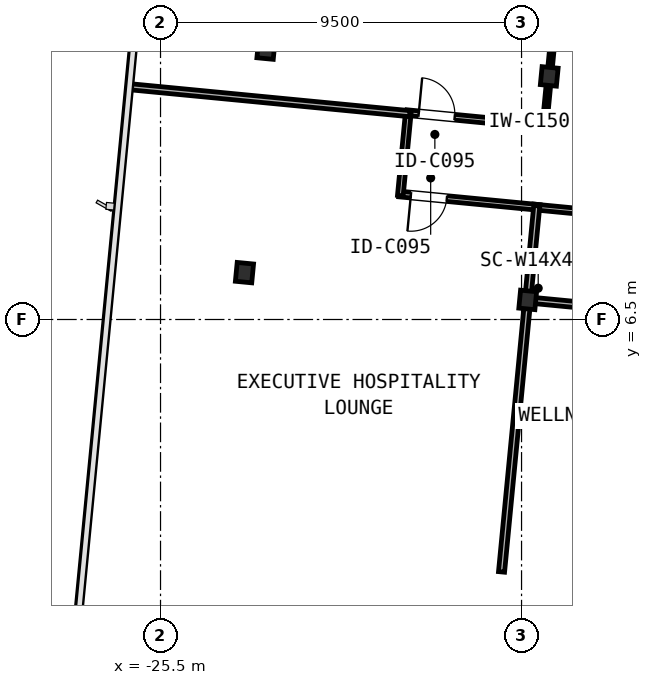
"""IFC4 building model, lengths in metres.
Left out: names, types, materials, properties, quantities, classifications, styles, units other than length and angle.
Written with IfcOpenShell. Run it as: python <this file> out.ifc"""

import sys

from ifc_helpers import new_model, si_unit, direction, frame, frame_2d, origin, origin_2d, place, context, subcontext, project, spatial, rectangle, i_section, extrude, element, fill, save


model = new_model("IFC4")
c1 = context("Model", 3, precision=1e-05, world=origin(), true_north=direction((0.0, 1.0)))
c2 = subcontext(c1, "Body", "Model", "MODEL_VIEW")
j1 = project(units=[si_unit("LENGTHUNIT", "METRE"), si_unit("PLANEANGLEUNIT", "RADIAN")], contexts=[c1])
p1 = place(None, origin())
s1 = spatial("IfcSite", under=j1, at=p1, CompositionType="ELEMENT")
p2 = place(p1, origin())
s2 = spatial("IfcBuilding", under=s1, at=p2, CompositionType="ELEMENT")
p3 = place(p2, frame((0.0, 0.0, 142.8)))
s3 = spatial("IfcBuildingStorey", under=s2, at=p3, CompositionType="ELEMENT", Elevation=142.8)
for number, where, z_axis, x_axis in (
    (1, (-23.291, 7.733, 0.0), (0.0, 0.0, 1.0), (0.995, -0.096, 0.0)),
    (2, (-22.725, 13.614, 0.0), (0.0, 0.0, 1.0), (0.995, -0.096, 0.0)),
):
    element("IfcColumn", number, at=place(p3, frame(where, z_axis=z_axis, x_axis=x_axis)), inside=s3, PredefinedType="COLUMN", context=c2, shape_type="SweptSolid", body=[
        extrude(i_section(OverallWidth=0.432, OverallDepth=0.498, WebThickness=0.056, FlangeThickness=0.089, FilletRadius=0.031, at=origin_2d()), origin(), (0.0, 0.0, 1.0), 3.45),
    ])
for number, where, z_axis, x_axis in (
    (3, (-15.837, 7.015, 0.0), (0.0, 0.0, 1.0), (0.995, -0.096, 0.0)),
    (4, (-15.271, 12.896, 0.0), (0.0, 0.0, 1.0), (0.995, -0.096, 0.0)),
):
    element("IfcColumn", number, at=place(p3, frame(where, z_axis=z_axis, x_axis=x_axis)), inside=s3, PredefinedType="COLUMN", context=c2, shape_type="SweptSolid", body=[
        extrude(i_section(OverallWidth=0.424, OverallDepth=0.474, WebThickness=0.048, FlangeThickness=0.077, FilletRadius=0.031, at=origin_2d()), origin(), (0.0, 0.0, 1.0), 3.45),
    ])
p4 = place(p3, frame((-19.02, 11.943, 0.0), z_axis=(0.0, 0.0, 1.0), x_axis=(0.995397364202, -0.095833644092, 0.0)))
e5 = element("IfcWall", 5, at=p4, inside=s3, PredefinedType="PARTITIONING", context=c2, shape_type="SweptSolid", body=[
    extrude(rectangle(XDim=3.722, YDim=0.15, at=frame_2d((1.861, 0.0))), origin(), (0.0, 0.0, 1.0), 2.479),
])
p5 = place(p4, frame((0.315, 0.0, 0.0)))
e6 = element("IfcOpeningElement", 6, at=p5, cuts=e5, PredefinedType="OPENING", context=c2, shape_type="SweptSolid", body=[
    extrude(rectangle(XDim=0.95, YDim=2.15, at=frame_2d((0.475, 1.075))), frame((0.0, 0.085, 0.0), z_axis=(0.0, -1.0, 0.0), x_axis=(1.0, 0.0, 0.0)), (0.0, 0.0, 1.0), 0.17),
])
p6 = place(p3, frame((-15.478, 11.602, 0.0), z_axis=(0.0, 0.0, 1.0), x_axis=(0.995398413865, -0.095822740911, 0.0)))
e7 = element("IfcWall", 7, at=p6, inside=s3, PredefinedType="PARTITIONING", context=c2, shape_type="SweptSolid", body=[
    extrude(rectangle(XDim=2.614, YDim=0.15, at=frame_2d((1.307, 0.0))), origin(), (0.0, 0.0, 1.0), 2.479),
])
p7 = place(p3, frame((3.121, 7.651, 0.0), z_axis=(0.0, 0.0, 1.0), x_axis=(-0.995397135603, 0.095836018457, 0.0)))
e8 = element("IfcWall", 8, at=p7, inside=s3, PredefinedType="PARTITIONING", context=c2, shape_type="SweptSolid", body=[
    extrude(rectangle(XDim=18.892, YDim=0.15, at=frame_2d((9.446, 0.0))), origin(), (0.0, 0.0, 1.0), 2.479),
])
p8 = place(p7, frame((14.502, 0.0, 0.0)))
e9 = element("IfcOpeningElement", 9, at=p8, cuts=e8, PredefinedType="OPENING", context=c2, shape_type="SweptSolid", body=[
    extrude(rectangle(XDim=0.95, YDim=2.15, at=frame_2d((0.475, 1.075))), frame((0.0, 0.085, 0.0), z_axis=(0.0, -1.0, 0.0), x_axis=(1.0, 0.0, 0.0)), (0.0, 0.0, 1.0), 0.17),
])
p9 = place(p3, frame((-15.521, 9.446, 0.0), z_axis=(0.0, 0.0, 1.0), x_axis=(-0.995397364202, 0.095833644092, 0.0)))
e10 = element("IfcWall", 10, at=p9, inside=s3, PredefinedType="PARTITIONING", context=c2, shape_type="SweptSolid", body=[
    extrude(rectangle(XDim=3.722, YDim=0.15, at=frame_2d((1.861, 0.0))), origin(), (0.0, 0.0, 1.0), 2.479),
])
p10 = place(p9, frame((2.457, 0.0, 0.0)))
e11 = element("IfcOpeningElement", 11, at=p10, cuts=e10, PredefinedType="OPENING", context=c2, shape_type="SweptSolid", body=[
    extrude(rectangle(XDim=0.95, YDim=2.15, at=frame_2d((0.475, 1.075))), frame((0.0, 0.085, 0.0), z_axis=(0.0, -1.0, 0.0), x_axis=(1.0, 0.0, 0.0)), (0.0, 0.0, 1.0), 0.17),
])
p11 = place(p3, frame((-19.19, 9.759, 0.0), z_axis=(0.0, 0.0, 1.0), x_axis=(0.095882898123, 0.995392620953, 0.0)))
e12 = element("IfcWall", 12, at=p11, inside=s3, PredefinedType="PARTITIONING", context=c2, shape_type="SweptSolid", body=[
    extrude(rectangle(XDim=2.21, YDim=0.15, at=frame_2d((1.105, 0.0))), origin(), (0.0, 0.0, 1.0), 2.718),
])
p12 = place(p3, frame((-15.288, 12.721, 0.0), z_axis=(0.0, 0.0, 1.0), x_axis=(-0.095831494917, -0.995397571115, 0.0)))
e13 = element("IfcWall", 13, at=p12, inside=s3, PredefinedType="PARTITIONING", context=c2, shape_type="SweptSolid", body=[
    extrude(rectangle(XDim=1.172, YDim=0.12, at=frame_2d((0.586, 0.0))), origin(), (0.0, 0.0, 1.0), 2.479),
])
p13 = place(p3, frame((-15.144, 14.214, 0.0), z_axis=(0.0, 0.0, 1.0), x_axis=(-0.09590284245, -0.99539069958, 0.0)))
e14 = element("IfcWall", 14, at=p13, inside=s3, PredefinedType="PARTITIONING", context=c2, shape_type="SweptSolid", body=[
    extrude(rectangle(XDim=1.148, YDim=0.12, at=frame_2d((0.574, 0.0))), origin(), (0.0, 0.0, 1.0), 2.479),
])
p14 = place(p3, frame((-18.942, 11.916, 0.0), z_axis=(0.0, 0.0, 1.0), x_axis=(-0.995395927026, 0.095848570461, 0.0)))
e15 = element("IfcWall", 15, at=p14, inside=s3, PredefinedType="PARTITIONING", context=c2, shape_type="SweptSolid", body=[
    extrude(rectangle(XDim=7.448, YDim=0.16, at=frame_2d((3.724, 0.0))), origin(), (0.0, 0.0, 1.0), 2.557),
])
p15 = place(p3, frame((-15.821, 7.191, 0.0), z_axis=(0.0, 0.0, 1.0), x_axis=(0.09580488871, 0.995400132258, 0.0)))
e16 = element("IfcWall", 16, at=p15, inside=s3, PredefinedType="PARTITIONING", context=c2, shape_type="SweptSolid", body=[
    extrude(rectangle(XDim=2.314, YDim=0.16, at=frame_2d((1.157, 0.0))), origin(), (0.0, 0.0, 1.0), 2.479),
])
p16 = place(p3, frame((-8.093, 6.27, 0.0), z_axis=(0.0, 0.0, 1.0), x_axis=(-0.995396962155, 0.095837819954, 0.0)))
e17 = element("IfcWall", 17, at=p16, inside=s3, PredefinedType="PARTITIONING", context=c2, shape_type="SweptSolid", body=[
    extrude(rectangle(XDim=7.604, YDim=0.16, at=frame_2d((3.802, 0.0))), origin(), (0.0, 0.0, 1.0), 2.479),
])
p17 = place(p3, frame((-15.854, 6.84, 0.0), z_axis=(0.0, 0.0, 1.0), x_axis=(-0.095860309466, -0.995394796585, 0.0)))
e18 = element("IfcWall", 18, at=p17, inside=s3, PredefinedType="PARTITIONING", context=c2, shape_type="SweptSolid", body=[
    extrude(rectangle(XDim=7.014, YDim=0.16, at=frame_2d((3.507, 0.0))), origin(), (0.0, 0.0, 1.0), 2.479),
])
p18 = place(p5, frame((0.95, 0.0, 0.0), z_axis=(0.0, 0.0, 1.0), x_axis=(-1.0, 0.0, 0.0)))
e19 = element("IfcDoor", 19, at=p18, inside=s3, OperationType="SINGLE_SWING_LEFT", PredefinedType="DOOR", context=c2, shape_type="SweptSolid", body=[
    extrude(rectangle(XDim=0.95, YDim=2.15, at=frame_2d((0.475, 1.075))), frame((0.0, 0.025, 0.0), z_axis=(0.0, -1.0, 0.0), x_axis=(1.0, 0.0, 0.0)), (0.0, 0.0, 1.0), 0.05),
])
fill(e6, e19)
p19 = place(p10, frame((0.95, 0.0, 0.0), z_axis=(0.0, 0.0, 1.0), x_axis=(-1.0, 0.0, 0.0)))
e20 = element("IfcDoor", 20, at=p19, inside=s3, OperationType="SINGLE_SWING_RIGHT", PredefinedType="DOOR", context=c2, shape_type="SweptSolid", body=[
    extrude(rectangle(XDim=0.95, YDim=2.15, at=frame_2d((0.475, 1.075))), frame((0.0, 0.025, 0.0), z_axis=(0.0, -1.0, 0.0), x_axis=(1.0, 0.0, 0.0)), (0.0, 0.0, 1.0), 0.05),
])
fill(e11, e20)
save(model, sys.argv[1])
